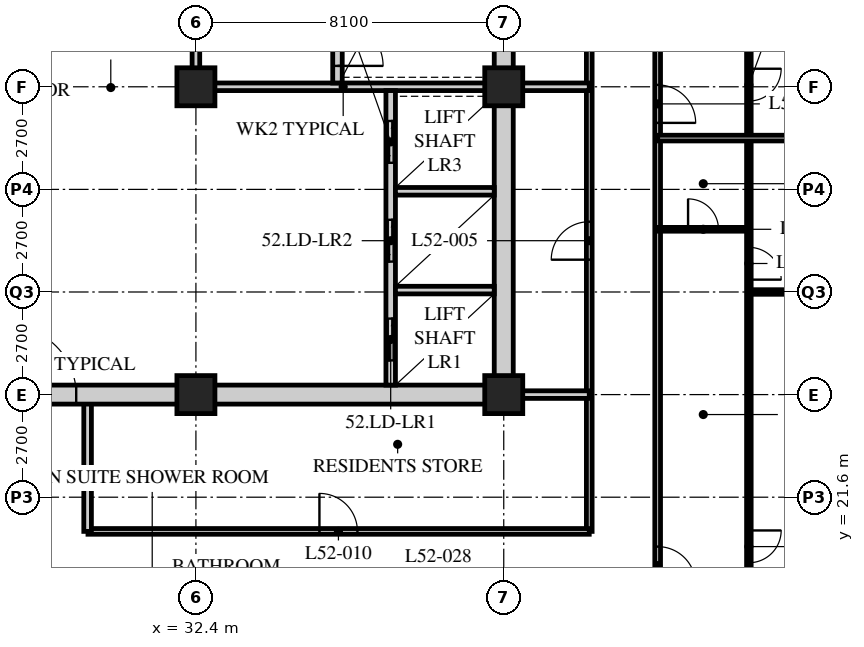
"""IFC4 building model, lengths in metres.
Left out: names, types, materials, properties, quantities, classifications, styles, units other than length and angle.
Written with IfcOpenShell. Run it as: python <this file> out.ifc"""

import sys

from ifc_helpers import new_model, si_unit, direction, frame, frame_2d, origin, origin_2d, place, context, subcontext, project, spatial, rectangle, hollow_rectangle, extrude, element, fill, save


model = new_model("IFC4")
c1 = context("Model", 3, precision=1e-05, world=origin(), true_north=direction((0.0, 1.0)))
c2 = subcontext(c1, "Body", "Model", "MODEL_VIEW")
j1 = project(units=[si_unit("LENGTHUNIT", "METRE"), si_unit("PLANEANGLEUNIT", "RADIAN")], contexts=[c1])
p1 = place(None, origin())
s1 = spatial("IfcSite", under=j1, at=p1, CompositionType="ELEMENT")
p2 = place(p1, origin())
s2 = spatial("IfcBuilding", under=s1, at=p2, CompositionType="ELEMENT")
p3 = place(p2, frame((0.0, 0.0, 202.8)))
s3 = spatial("IfcBuildingStorey", under=s2, at=p3, CompositionType="ELEMENT", Elevation=202.8)
for number, where, z_axis, x_axis in (
    (1, (32.4, 24.3, 0.0), (0.0, 0.0, 1.0), (1.0, 0.0, 0.0)),
    (2, (32.4, 32.4, 0.0), (0.0, 0.0, 1.0), (1.0, 0.0, 0.0)),
    (3, (40.5, 24.3, 0.0), (0.0, 0.0, 1.0), (1.0, 0.0, 0.0)),
    (4, (40.5, 32.4, 0.0), (0.0, 0.0, 1.0), (1.0, 0.0, 0.0)),
):
    element("IfcColumn", number, at=place(p3, frame(where, z_axis=z_axis, x_axis=x_axis)), inside=s3, PredefinedType="COLUMN", context=c2, shape_type="SweptSolid", body=[
        extrude(hollow_rectangle(XDim=1.0, YDim=1.0, WallThickness=0.1, at=origin_2d()), origin(), (0.0, 0.0, 1.0), 3.6),
    ])
p4 = place(p3, frame((44.55, 18.9, 0.0), z_axis=(0.0, 0.0, 1.0), x_axis=(0.0, 1.0, 0.0)))
e5 = element("IfcWall", 5, at=p4, inside=s3, PredefinedType="PARTITIONING", context=c2, shape_type="SweptSolid", body=[
    extrude(rectangle(XDim=28.35, YDim=0.15, at=frame_2d((14.175, 0.0))), origin(), (0.0, 0.0, 1.0), 3.39),
])
p5 = place(p4, frame((0.4, 0.0, 0.0)))
e6 = element("IfcOpeningElement", 6, at=p5, cuts=e5, PredefinedType="OPENING", context=c2, shape_type="SweptSolid", body=[
    extrude(rectangle(XDim=1.0, YDim=2.1, at=frame_2d((0.5, 1.05))), frame((0.0, 0.085, 0.0), z_axis=(0.0, -1.0, 0.0), x_axis=(1.0, 0.0, 0.0)), (0.0, 0.0, 1.0), 0.17),
])
p6 = place(p4, frame((12.55, 0.0, 0.0)))
e7 = element("IfcOpeningElement", 7, at=p6, cuts=e5, PredefinedType="OPENING", context=c2, shape_type="SweptSolid", body=[
    extrude(rectangle(XDim=1.0, YDim=2.1, at=frame_2d((0.5, 1.05))), frame((0.0, 0.085, 0.0), z_axis=(0.0, -1.0, 0.0), x_axis=(1.0, 0.0, 0.0)), (0.0, 0.0, 1.0), 0.17),
])
p7 = place(p4, frame((26.65, 0.0, 0.0)))
e8 = element("IfcOpeningElement", 8, at=p7, cuts=e5, PredefinedType="OPENING", context=c2, shape_type="SweptSolid", body=[
    extrude(rectangle(XDim=1.0, YDim=2.1, at=frame_2d((0.5, 1.05))), frame((0.0, 0.085, 0.0), z_axis=(0.0, -1.0, 0.0), x_axis=(1.0, 0.0, 0.0)), (0.0, 0.0, 1.0), 0.17),
])
p8 = place(p3, frame((42.75, 20.7, 0.0), z_axis=(0.0, 0.0, 1.0), x_axis=(0.0, 1.0, 0.0)))
e9 = element("IfcWall", 9, at=p8, inside=s3, PredefinedType="PARTITIONING", context=c2, shape_type="SweptSolid", body=[
    extrude(rectangle(XDim=24.75, YDim=0.15, at=frame_2d((12.375, 0.0))), origin(), (0.0, 0.0, 1.0), 3.39),
])
p9 = place(p8, frame((7.15, 0.0, 0.0)))
e10 = element("IfcOpeningElement", 10, at=p9, cuts=e9, PredefinedType="OPENING", context=c2, shape_type="SweptSolid", body=[
    extrude(rectangle(XDim=1.0, YDim=2.1, at=frame_2d((0.5, 1.05))), frame((0.0, 0.085, 0.0), z_axis=(0.0, -1.0, 0.0), x_axis=(1.0, 0.0, 0.0)), (0.0, 0.0, 1.0), 0.17),
])
p10 = place(p8, frame((15.25, 0.0, 0.0)))
e11 = element("IfcOpeningElement", 11, at=p10, cuts=e9, PredefinedType="OPENING", context=c2, shape_type="SweptSolid", body=[
    extrude(rectangle(XDim=1.0, YDim=2.1, at=frame_2d((0.5, 1.05))), frame((0.0, 0.085, 0.0), z_axis=(0.0, -1.0, 0.0), x_axis=(1.0, 0.0, 0.0)), (0.0, 0.0, 1.0), 0.17),
])
p11 = place(p3, frame((29.56, 20.7, 0.0), z_axis=(0.0, 0.0, 1.0), x_axis=(1.0, 0.0, 0.0)))
e12 = element("IfcWall", 12, at=p11, inside=s3, PredefinedType="PARTITIONING", context=c2, shape_type="SweptSolid", body=[
    extrude(rectangle(XDim=13.19, YDim=0.15, at=frame_2d((6.595, 0.0))), origin(), (0.0, 0.0, 1.0), 3.39),
])
p12 = place(p11, frame((6.09, 0.0, 0.0)))
e13 = element("IfcOpeningElement", 13, at=p12, cuts=e12, PredefinedType="OPENING", context=c2, shape_type="SweptSolid", body=[
    extrude(rectangle(XDim=1.0, YDim=2.1, at=frame_2d((0.5, 1.05))), frame((0.0, 0.085, 0.0), z_axis=(0.0, -1.0, 0.0), x_axis=(1.0, 0.0, 0.0)), (0.0, 0.0, 1.0), 0.17),
])
p13 = place(p3, frame((40.5, 32.4, 0.0), z_axis=(0.0, 0.0, 1.0), x_axis=(1.0, 0.0, 0.0)))
e14 = element("IfcWall", 14, at=p13, inside=s3, PredefinedType="SOLIDWALL", context=c2, shape_type="SweptSolid", body=[
    extrude(rectangle(XDim=2.25, YDim=0.2, at=frame_2d((1.125, 0.0))), origin(), (0.0, 0.0, 1.0), 3.39),
])
p14 = place(p3, frame((29.55, 20.7, 0.0), z_axis=(0.0, 0.0, 1.0), x_axis=(0.0, 1.0, 0.0)))
e15 = element("IfcWall", 15, at=p14, inside=s3, PredefinedType="SOLIDWALL", context=c2, shape_type="SweptSolid", body=[
    extrude(rectangle(XDim=3.6, YDim=0.2, at=frame_2d((1.8, 0.0))), origin(), (0.0, 0.0, 1.0), 3.39),
])
p15 = place(p3, frame((40.5, 24.3, 0.0), z_axis=(0.0, 0.0, 1.0), x_axis=(1.0, 0.0, 0.0)))
e16 = element("IfcWall", 16, at=p15, inside=s3, PredefinedType="SOLIDWALL", context=c2, shape_type="SweptSolid", body=[
    extrude(rectangle(XDim=2.25, YDim=0.2, at=frame_2d((1.125, 0.0))), origin(), (0.0, 0.0, 1.0), 3.39),
])
p16 = place(p3, frame((46.95, 18.9, 0.0), z_axis=(0.0, 0.0, 1.0), x_axis=(0.0, 1.0, 0.0)))
e17 = element("IfcWall", 17, at=p16, inside=s3, PredefinedType="PARTITIONING", context=c2, shape_type="SweptSolid", body=[
    extrude(rectangle(XDim=24.3, YDim=0.12, at=frame_2d((12.15, 0.0))), origin(), (0.0, 0.0, 1.0), 3.39),
])
p17 = place(p16, frame((0.975, 0.0, 0.0)))
e18 = element("IfcOpeningElement", 18, at=p17, cuts=e17, PredefinedType="OPENING", context=c2, shape_type="SweptSolid", body=[
    extrude(rectangle(XDim=0.85, YDim=2.1, at=frame_2d((0.425, 1.05))), frame((0.0, 0.07, 0.0), z_axis=(0.0, -1.0, 0.0), x_axis=(1.0, 0.0, 0.0)), (0.0, 0.0, 1.0), 0.14),
])
p18 = place(p16, frame((8.425, 0.0, 0.0)))
e19 = element("IfcOpeningElement", 19, at=p18, cuts=e17, PredefinedType="OPENING", context=c2, shape_type="SweptSolid", body=[
    extrude(rectangle(XDim=0.85, YDim=2.1, at=frame_2d((0.425, 1.05))), frame((0.0, 0.07, 0.0), z_axis=(0.0, -1.0, 0.0), x_axis=(1.0, 0.0, 0.0)), (0.0, 0.0, 1.0), 0.14),
])
p19 = place(p16, frame((13.125, 0.0, 0.0)))
e20 = element("IfcOpeningElement", 20, at=p19, cuts=e17, PredefinedType="OPENING", context=c2, shape_type="SweptSolid", body=[
    extrude(rectangle(XDim=0.85, YDim=2.1, at=frame_2d((0.425, 1.05))), frame((0.0, 0.07, 0.0), z_axis=(0.0, -1.0, 0.0), x_axis=(1.0, 0.0, 0.0)), (0.0, 0.0, 1.0), 0.14),
])
p20 = place(p16, frame((20.575, 0.0, 0.0)))
e21 = element("IfcOpeningElement", 21, at=p20, cuts=e17, PredefinedType="OPENING", context=c2, shape_type="SweptSolid", body=[
    extrude(rectangle(XDim=0.85, YDim=2.1, at=frame_2d((0.425, 1.05))), frame((0.0, 0.07, 0.0), z_axis=(0.0, -1.0, 0.0), x_axis=(1.0, 0.0, 0.0)), (0.0, 0.0, 1.0), 0.14),
])
p21 = place(p3, frame((44.55, 28.65, 0.0), z_axis=(0.0, 0.0, 1.0), x_axis=(1.0, 0.0, 0.0)))
e22 = element("IfcWall", 22, at=p21, inside=s3, PredefinedType="PARTITIONING", context=c2, shape_type="SweptSolid", body=[
    extrude(rectangle(XDim=2.4, YDim=0.1, at=frame_2d((1.2, 0.0))), origin(), (0.0, 0.0, 1.0), 3.39),
])
p22 = place(p21, frame((0.8, 0.0, 0.0)))
e23 = element("IfcOpeningElement", 23, at=p22, cuts=e22, PredefinedType="OPENING", context=c2, shape_type="SweptSolid", body=[
    extrude(rectangle(XDim=0.8, YDim=2.1, at=frame_2d((0.4, 1.05))), frame((0.0, 0.06, 0.0), z_axis=(0.0, -1.0, 0.0), x_axis=(1.0, 0.0, 0.0)), (0.0, 0.0, 1.0), 0.12),
])
p23 = place(p3, frame((46.95, 27.0, 0.0), z_axis=(0.0, 0.0, 1.0), x_axis=(1.0, 0.0, 0.0)))
e24 = element("IfcWall", 24, at=p23, inside=s3, PredefinedType="PARTITIONING", context=c2, shape_type="SweptSolid", body=[
    extrude(rectangle(XDim=9.45, YDim=0.12, at=frame_2d((4.725, 0.0))), origin(), (0.0, 0.0, 1.0), 2.778),
])
p24 = place(p3, frame((44.55, 31.05, 0.0), z_axis=(0.0, 0.0, 1.0), x_axis=(1.0, 0.0, 0.0)))
e25 = element("IfcWall", 25, at=p24, inside=s3, PredefinedType="PARTITIONING", context=c2, shape_type="SweptSolid", body=[
    extrude(rectangle(XDim=11.85, YDim=0.15, at=frame_2d((5.925, 0.0))), origin(), (0.0, 0.0, 1.0), 3.39),
])
p25 = place(p3, frame((15.95, 24.3, 0.0), z_axis=(0.0, 0.0, 1.0), x_axis=(1.0, 0.0, 0.0)))
e26 = element("IfcWall", 26, at=p25, inside=s3, PredefinedType="SOLIDWALL", context=c2, shape_type="SweptSolid", body=[
    extrude(rectangle(XDim=24.8, YDim=0.5, at=frame_2d((12.4, 0.0))), origin(), (0.0, 0.0, 1.0), 2.74),
])
p26 = place(p25, frame((11.5, 0.0, 0.0)))
e27 = element("IfcOpeningElement", 27, at=p26, cuts=e26, PredefinedType="OPENING", context=c2, shape_type="SweptSolid", body=[
    extrude(rectangle(XDim=1.8, YDim=2.4, at=frame_2d((0.9, 1.2))), frame((0.0, 0.26, 0.0), z_axis=(0.0, -1.0, 0.0), x_axis=(1.0, 0.0, 0.0)), (0.0, 0.0, 1.0), 0.52),
])
p27 = place(p3, frame((40.5, 24.55, 0.0), z_axis=(0.0, 0.0, 1.0), x_axis=(0.0, 1.0, 0.0)))
e28 = element("IfcWall", 28, at=p27, inside=s3, PredefinedType="SOLIDWALL", context=c2, shape_type="SweptSolid", body=[
    extrude(rectangle(XDim=15.7, YDim=0.5, at=frame_2d((7.85, 0.0))), origin(), (0.0, 0.0, 1.0), 2.778),
])
p28 = place(p3, frame((32.3, 32.4, 0.0), z_axis=(0.0, 0.0, 1.0), x_axis=(1.0, 0.0, 0.0)))
e29 = element("IfcWall", 29, at=p28, inside=s3, PredefinedType="SOLIDWALL", context=c2, shape_type="SweptSolid", body=[
    extrude(rectangle(XDim=7.95, YDim=0.2, at=frame_2d((3.975, 0.0))), origin(), (0.0, 0.0, 1.0), 2.778),
])
p29 = place(p3, frame((32.4, 32.5, 0.0), z_axis=(0.0, 0.0, 1.0), x_axis=(0.0, 1.0, 0.0)))
e30 = element("IfcWall", 30, at=p29, inside=s3, PredefinedType="SOLIDWALL", context=c2, shape_type="SweptSolid", body=[
    extrude(rectangle(XDim=7.75, YDim=0.2, at=frame_2d((3.875, 0.0))), origin(), (0.0, 0.0, 1.0), 2.778),
])
p30 = place(p29, frame((1.9, 0.0, 0.0)))
e31 = element("IfcOpeningElement", 31, at=p30, cuts=e30, PredefinedType="OPENING", context=c2, shape_type="SweptSolid", body=[
    extrude(rectangle(XDim=1.2, YDim=2.1, at=frame_2d((0.6, 1.05))), frame((0.0, 0.11, 0.0), z_axis=(0.0, -1.0, 0.0), x_axis=(1.0, 0.0, 0.0)), (0.0, 0.0, 1.0), 0.22),
])
p31 = place(p3, frame((37.525, 24.55, 0.0), z_axis=(0.0, 0.0, 1.0), x_axis=(0.0, 1.0, 0.0)))
e32 = element("IfcWall", 32, at=p31, inside=s3, PredefinedType="SOLIDWALL", context=c2, shape_type="SweptSolid", body=[
    extrude(rectangle(XDim=7.75, YDim=0.25, at=frame_2d((3.875, 0.0))), origin(), (0.0, 0.0, 1.0), 3.39),
])
p32 = place(p31, frame((0.65, 0.0, 0.0)))
e33 = element("IfcOpeningElement", 33, at=p32, cuts=e32, PredefinedType="OPENING", context=c2, shape_type="SweptSolid", body=[
    extrude(rectangle(XDim=1.1, YDim=2.4, at=frame_2d((0.55, 1.2))), frame((0.0, 0.135, 0.0), z_axis=(0.0, -1.0, 0.0), x_axis=(1.0, 0.0, 0.0)), (0.0, 0.0, 1.0), 0.27),
])
p33 = place(p31, frame((3.25, 0.0, 0.0)))
e34 = element("IfcOpeningElement", 34, at=p33, cuts=e32, PredefinedType="OPENING", context=c2, shape_type="SweptSolid", body=[
    extrude(rectangle(XDim=1.1, YDim=2.4, at=frame_2d((0.55, 1.2))), frame((0.0, 0.135, 0.0), z_axis=(0.0, -1.0, 0.0), x_axis=(1.0, 0.0, 0.0)), (0.0, 0.0, 1.0), 0.27),
])
p34 = place(p31, frame((5.85, 0.0, 0.0)))
e35 = element("IfcOpeningElement", 35, at=p34, cuts=e32, PredefinedType="OPENING", context=c2, shape_type="SweptSolid", body=[
    extrude(rectangle(XDim=1.1, YDim=2.4, at=frame_2d((0.55, 1.2))), frame((0.0, 0.135, 0.0), z_axis=(0.0, -1.0, 0.0), x_axis=(1.0, 0.0, 0.0)), (0.0, 0.0, 1.0), 0.27),
])
for number, where, z_axis, x_axis in (
    (36, (37.65, 27.05, 0.0), (0.0, 0.0, 1.0), (1.0, 0.0, 0.0)),
    (37, (37.65, 29.65, 0.0), (0.0, 0.0, 1.0), (1.0, 0.0, 0.0)),
):
    element("IfcWall", number, at=place(p3, frame(where, z_axis=z_axis, x_axis=x_axis)), inside=s3, PredefinedType="SOLIDWALL", context=c2, shape_type="SweptSolid", body=[
        extrude(rectangle(XDim=2.6, YDim=0.2, at=frame_2d((1.3, 0.0))), origin(), (0.0, 0.0, 1.0), 3.39),
    ])
p35 = place(p3, frame((36.125, 32.5, 0.0), z_axis=(0.0, 0.0, 1.0), x_axis=(0.0, 1.0, 0.0)))
e38 = element("IfcWall", 38, at=p35, inside=s3, PredefinedType="SOLIDWALL", context=c2, shape_type="SweptSolid", body=[
    extrude(rectangle(XDim=7.75, YDim=0.25, at=frame_2d((3.875, 0.0))), origin(), (0.0, 0.0, 1.0), 3.39),
])
p36 = place(p35, frame((0.45, 0.0, 0.0)))
e39 = element("IfcOpeningElement", 39, at=p36, cuts=e38, PredefinedType="OPENING", context=c2, shape_type="SweptSolid", body=[
    extrude(rectangle(XDim=1.2, YDim=2.1, at=frame_2d((0.6, 1.05))), frame((0.0, 0.135, 0.0), z_axis=(0.0, -1.0, 0.0), x_axis=(1.0, 0.0, 0.0)), (0.0, 0.0, 1.0), 0.27),
])
p37 = place(p9, origin())
e40 = element("IfcDoor", 40, at=p37, inside=s3, OperationType="SINGLE_SWING_LEFT", PredefinedType="DOOR", context=c2, shape_type="SweptSolid", body=[
    extrude(rectangle(XDim=1.0, YDim=2.1, at=frame_2d((0.5, 1.05))), frame((0.0, 0.025, 0.0), z_axis=(0.0, -1.0, 0.0), x_axis=(1.0, 0.0, 0.0)), (0.0, 0.0, 1.0), 0.05),
])
fill(e10, e40)
p38 = place(p12, origin())
e41 = element("IfcDoor", 41, at=p38, inside=s3, OperationType="SINGLE_SWING_LEFT", PredefinedType="DOOR", context=c2, shape_type="SweptSolid", body=[
    extrude(rectangle(XDim=1.0, YDim=2.1, at=frame_2d((0.5, 1.05))), frame((0.0, 0.025, 0.0), z_axis=(0.0, -1.0, 0.0), x_axis=(1.0, 0.0, 0.0)), (0.0, 0.0, 1.0), 0.05),
])
fill(e13, e41)
p39 = place(p22, origin())
e42 = element("IfcDoor", 42, at=p39, inside=s3, OperationType="SINGLE_SWING_LEFT", PredefinedType="DOOR", context=c2, shape_type="SweptSolid", body=[
    extrude(rectangle(XDim=0.8, YDim=2.1, at=frame_2d((0.4, 1.05))), frame((0.0, 0.025, 0.0), z_axis=(0.0, -1.0, 0.0), x_axis=(1.0, 0.0, 0.0)), (0.0, 0.0, 1.0), 0.05),
])
fill(e23, e42)
p40 = place(p5, origin())
e43 = element("IfcDoor", 43, at=p40, inside=s3, OperationType="SINGLE_SWING_RIGHT", PredefinedType="DOOR", context=c2, shape_type="SweptSolid", body=[
    extrude(rectangle(XDim=1.0, YDim=2.1, at=frame_2d((0.5, 1.05))), frame((0.0, 0.025, 0.0), z_axis=(0.0, -1.0, 0.0), x_axis=(1.0, 0.0, 0.0)), (0.0, 0.0, 1.0), 0.05),
])
fill(e6, e43)
p41 = place(p17, origin())
e44 = element("IfcDoor", 44, at=p41, inside=s3, OperationType="SINGLE_SWING_LEFT", PredefinedType="DOOR", context=c2, shape_type="SweptSolid", body=[
    extrude(rectangle(XDim=0.85, YDim=2.1, at=frame_2d((0.425, 1.05))), frame((0.0, 0.025, 0.0), z_axis=(0.0, -1.0, 0.0), x_axis=(1.0, 0.0, 0.0)), (0.0, 0.0, 1.0), 0.05),
])
fill(e18, e44)
p42 = place(p18, origin())
e45 = element("IfcDoor", 45, at=p42, inside=s3, OperationType="SINGLE_SWING_RIGHT", PredefinedType="DOOR", context=c2, shape_type="SweptSolid", body=[
    extrude(rectangle(XDim=0.85, YDim=2.1, at=frame_2d((0.425, 1.05))), frame((0.0, 0.025, 0.0), z_axis=(0.0, -1.0, 0.0), x_axis=(1.0, 0.0, 0.0)), (0.0, 0.0, 1.0), 0.05),
])
fill(e19, e45)
p43 = place(p6, origin())
e46 = element("IfcDoor", 46, at=p43, inside=s3, OperationType="SINGLE_SWING_RIGHT", PredefinedType="DOOR", context=c2, shape_type="SweptSolid", body=[
    extrude(rectangle(XDim=1.0, YDim=2.1, at=frame_2d((0.5, 1.05))), frame((0.0, 0.025, 0.0), z_axis=(0.0, -1.0, 0.0), x_axis=(1.0, 0.0, 0.0)), (0.0, 0.0, 1.0), 0.05),
])
fill(e7, e46)
p44 = place(p19, origin())
e47 = element("IfcDoor", 47, at=p44, inside=s3, OperationType="SINGLE_SWING_LEFT", PredefinedType="DOOR", context=c2, shape_type="SweptSolid", body=[
    extrude(rectangle(XDim=0.85, YDim=2.1, at=frame_2d((0.425, 1.05))), frame((0.0, 0.025, 0.0), z_axis=(0.0, -1.0, 0.0), x_axis=(1.0, 0.0, 0.0)), (0.0, 0.0, 1.0), 0.05),
])
fill(e20, e47)
p45 = place(p36, origin())
e48 = element("IfcDoor", 48, at=p45, inside=s3, OperationType="SINGLE_SWING_RIGHT", PredefinedType="DOOR", context=c2, shape_type="SweptSolid", body=[
    extrude(rectangle(XDim=1.2, YDim=2.1, at=frame_2d((0.6, 1.05))), frame((0.0, 0.025, 0.0), z_axis=(0.0, -1.0, 0.0), x_axis=(1.0, 0.0, 0.0)), (0.0, 0.0, 1.0), 0.05),
])
fill(e39, e48)
p46 = place(p32, origin())
e49 = element("IfcDoor", 49, at=p46, inside=s3, OperationType="DOUBLE_DOOR_SLIDING", PredefinedType="DOOR", context=c2, shape_type="SweptSolid", body=[
    extrude(rectangle(XDim=1.1, YDim=2.4, at=frame_2d((0.55, 1.2))), frame((0.0, 0.025, 0.0), z_axis=(0.0, -1.0, 0.0), x_axis=(1.0, 0.0, 0.0)), (0.0, 0.0, 1.0), 0.05),
])
fill(e33, e49)
p47 = place(p33, origin())
e50 = element("IfcDoor", 50, at=p47, inside=s3, OperationType="DOUBLE_DOOR_SLIDING", PredefinedType="DOOR", context=c2, shape_type="SweptSolid", body=[
    extrude(rectangle(XDim=1.1, YDim=2.4, at=frame_2d((0.55, 1.2))), frame((0.0, 0.025, 0.0), z_axis=(0.0, -1.0, 0.0), x_axis=(1.0, 0.0, 0.0)), (0.0, 0.0, 1.0), 0.05),
])
fill(e34, e50)
p48 = place(p34, origin())
e51 = element("IfcDoor", 51, at=p48, inside=s3, OperationType="DOUBLE_DOOR_SLIDING", PredefinedType="DOOR", context=c2, shape_type="SweptSolid", body=[
    extrude(rectangle(XDim=1.1, YDim=2.4, at=frame_2d((0.55, 1.2))), frame((0.0, 0.025, 0.0), z_axis=(0.0, -1.0, 0.0), x_axis=(1.0, 0.0, 0.0)), (0.0, 0.0, 1.0), 0.05),
])
fill(e35, e51)
p49 = place(p26, origin())
e52 = element("IfcDoor", 52, at=p49, inside=s3, OperationType="DOUBLE_DOOR_SINGLE_SWING", PredefinedType="DOOR", context=c2, shape_type="SweptSolid", body=[
    extrude(rectangle(XDim=1.8, YDim=2.4, at=frame_2d((0.9, 1.2))), frame((0.0, 0.025, 0.0), z_axis=(0.0, -1.0, 0.0), x_axis=(1.0, 0.0, 0.0)), (0.0, 0.0, 1.0), 0.05),
])
fill(e27, e52)
save(model, sys.argv[1])
